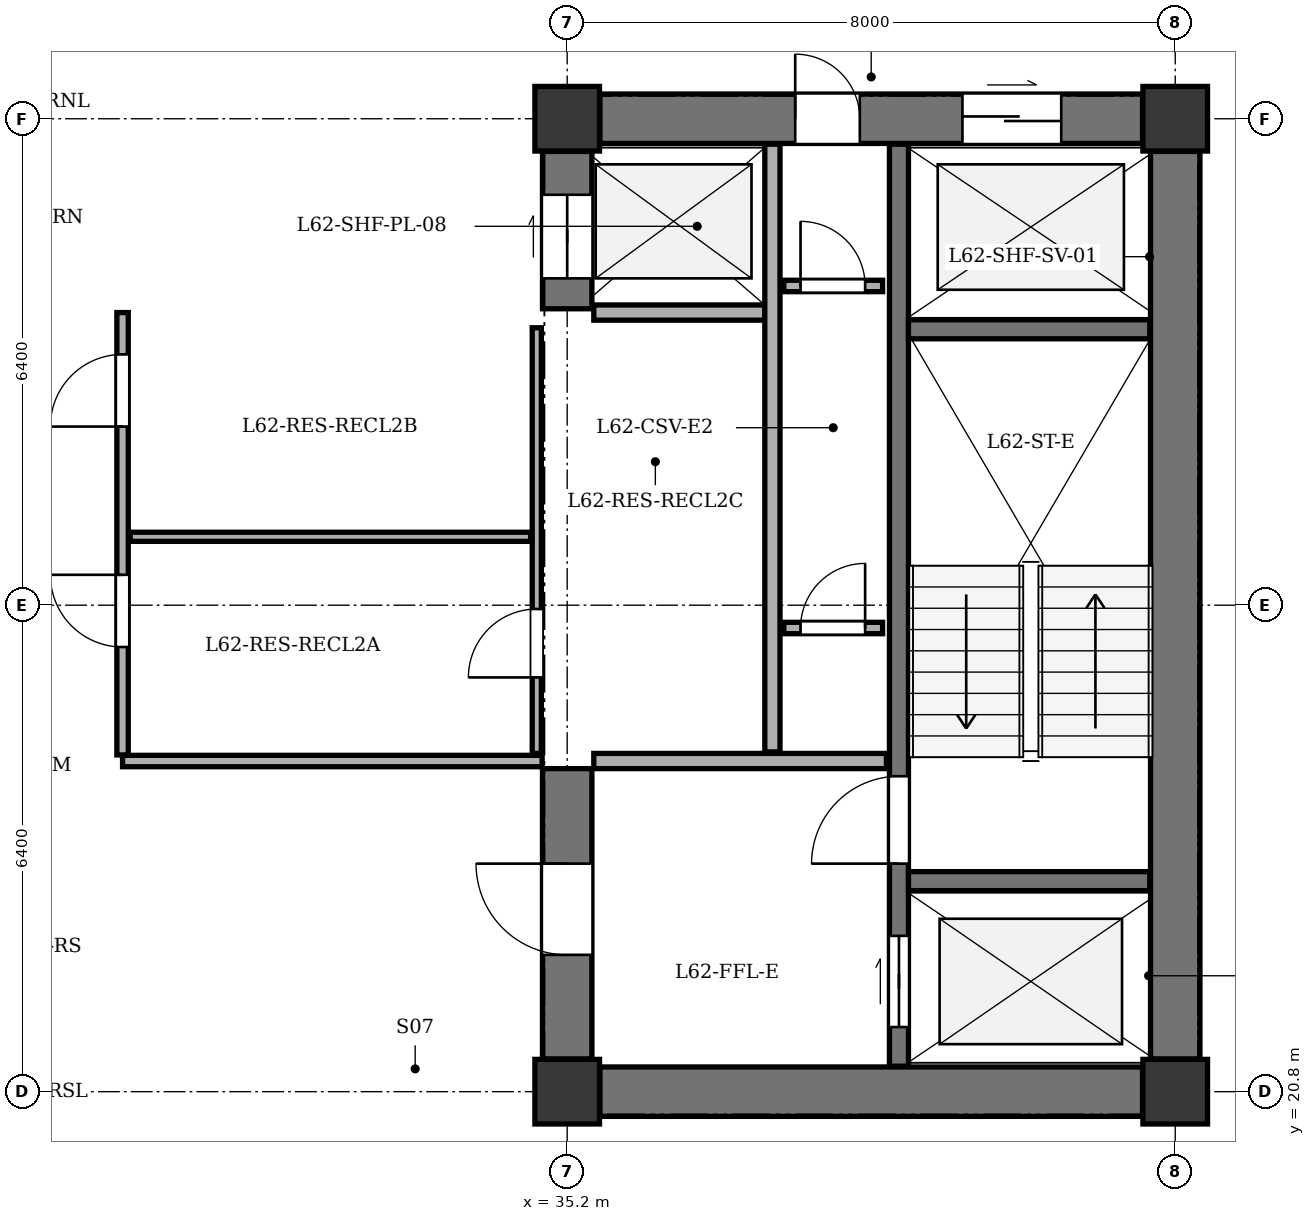
"""IFC4 building model, lengths in metres.
Left out: names, types, materials, properties, quantities, classifications, styles, units other than length and angle.
Written with IfcOpenShell. Run it as: python <this file> out.ifc"""

import sys

from ifc_helpers import new_model, si_unit, direction, frame, frame_2d, origin, origin_2d, place, context, subcontext, project, spatial, rectangle, extrude, element, fill, save


model = new_model("IFC4")
c1 = context("Model", 3, precision=1e-05, world=origin(), true_north=direction((0.0, 1.0)))
c2 = subcontext(c1, "Body", "Model", "MODEL_VIEW")
j1 = project(units=[si_unit("LENGTHUNIT", "METRE"), si_unit("PLANEANGLEUNIT", "RADIAN")], contexts=[c1])
p1 = place(None, origin())
s1 = spatial("IfcSite", under=j1, at=p1, CompositionType="ELEMENT")
p2 = place(p1, origin())
s2 = spatial("IfcBuilding", under=s1, at=p2, CompositionType="ELEMENT")
p3 = place(p2, frame((0.0, 0.0, 238.1)))
s3 = spatial("IfcBuildingStorey", under=s2, at=p3, CompositionType="ELEMENT", Elevation=238.1)
for number, where, z_axis, x_axis in (
    (1, (35.2, 20.8, 0.0), (0.0, 0.0, 1.0), (1.0, 0.0, 0.0)),
    (2, (43.2, 20.8, 0.0), (0.0, 0.0, 1.0), (1.0, 0.0, 0.0)),
    (3, (35.2, 33.6, 0.0), (0.0, 0.0, 1.0), (1.0, 0.0, 0.0)),
    (4, (43.2, 33.6, 0.0), (0.0, 0.0, 1.0), (1.0, 0.0, 0.0)),
):
    element("IfcColumn", number, at=place(p3, frame(where, z_axis=z_axis, x_axis=x_axis)), inside=s3, PredefinedType="COLUMN", context=c2, shape_type="SweptSolid", body=[
        extrude(rectangle(XDim=0.85, YDim=0.85, at=origin_2d()), origin(), (0.0, 0.0, 1.0), 3.4),
    ])
p4 = place(p3, frame((43.2, 21.23, 0.0), z_axis=(0.0, 0.0, 1.0), x_axis=(0.0, 1.0, 0.0)))
e5 = element("IfcWall", 5, at=p4, inside=s3, PredefinedType="SHEAR", context=c2, shape_type="SweptSolid", body=[
    extrude(rectangle(XDim=11.94, YDim=0.65, at=frame_2d((5.97, 0.0))), origin(), (0.0, 0.0, 1.0), 3.1),
])
p5 = place(p3, frame((35.63, 20.8, 0.0), z_axis=(0.0, 0.0, 1.0), x_axis=(1.0, 0.0, 0.0)))
e6 = element("IfcWall", 6, at=p5, inside=s3, PredefinedType="SHEAR", context=c2, shape_type="SweptSolid", body=[
    extrude(rectangle(XDim=7.14, YDim=0.65, at=frame_2d((3.57, 0.0))), origin(), (0.0, 0.0, 1.0), 3.1),
])
p6 = place(p3, frame((35.63, 33.6, 0.0), z_axis=(0.0, 0.0, 1.0), x_axis=(1.0, 0.0, 0.0)))
e7 = element("IfcWall", 7, at=p6, inside=s3, PredefinedType="SHEAR", context=c2, shape_type="SweptSolid", body=[
    extrude(rectangle(XDim=7.14, YDim=0.65, at=frame_2d((3.57, 0.0))), origin(), (0.0, 0.0, 1.0), 3.1),
])
p7 = place(p6, frame((4.77, 0.0, 0.0)))
e8 = element("IfcOpeningElement", 8, at=p7, cuts=e7, PredefinedType="OPENING", context=c2, shape_type="SweptSolid", body=[
    extrude(rectangle(XDim=1.3, YDim=2.15, at=frame_2d((0.65, 1.075))), frame((0.0, 0.335, 0.0), z_axis=(0.0, -1.0, 0.0), x_axis=(1.0, 0.0, 0.0)), (0.0, 0.0, 1.0), 0.67),
])
p8 = place(p6, frame((2.57, 0.0, 0.0)))
e9 = element("IfcOpeningElement", 9, at=p8, cuts=e7, PredefinedType="OPENING", context=c2, shape_type="SweptSolid", body=[
    extrude(rectangle(XDim=0.85, YDim=2.02, at=frame_2d((0.425, 1.01))), frame((0.0, 0.335, 0.0), z_axis=(0.0, -1.0, 0.0), x_axis=(1.0, 0.0, 0.0)), (0.0, 0.0, 1.0), 0.67),
])
p9 = place(p3, frame((35.2, 21.23, 0.0), z_axis=(0.0, 0.0, 1.0), x_axis=(0.0, 1.0, 0.0)))
e10 = element("IfcWall", 10, at=p9, inside=s3, PredefinedType="SHEAR", context=c2, shape_type="SweptSolid", body=[
    extrude(rectangle(XDim=3.82, YDim=0.65, at=frame_2d((1.91, 0.0))), origin(), (0.0, 0.0, 1.0), 3.1),
])
p10 = place(p9, frame((1.37, 0.0, 0.0)))
e11 = element("IfcOpeningElement", 11, at=p10, cuts=e10, PredefinedType="OPENING", context=c2, shape_type="SweptSolid", body=[
    extrude(rectangle(XDim=1.2, YDim=2.15, at=frame_2d((0.6, 1.075))), frame((0.0, 0.335, 0.0), z_axis=(0.0, -1.0, 0.0), x_axis=(1.0, 0.0, 0.0)), (0.0, 0.0, 1.0), 0.67),
])
p11 = place(p3, frame((35.2, 31.1, 0.0), z_axis=(0.0, 0.0, 1.0), x_axis=(0.0, 1.0, 0.0)))
e12 = element("IfcWall", 12, at=p11, inside=s3, PredefinedType="SHEAR", context=c2, shape_type="SweptSolid", body=[
    extrude(rectangle(XDim=2.07, YDim=0.65, at=frame_2d((1.035, 0.0))), origin(), (0.0, 0.0, 1.0), 3.1),
])
p12 = place(p11, frame((0.4, 0.0, 0.0)))
e13 = element("IfcOpeningElement", 13, at=p12, cuts=e12, PredefinedType="OPENING", context=c2, shape_type="SweptSolid", body=[
    extrude(rectangle(XDim=1.1, YDim=2.1, at=frame_2d((0.55, 1.05))), frame((0.0, 0.335, 0.0), z_axis=(0.0, -1.0, 0.0), x_axis=(1.0, 0.0, 0.0)), (0.0, 0.0, 1.0), 0.67),
])
p13 = place(p3, frame((39.565, 21.135, 0.0), z_axis=(0.0, 0.0, 1.0), x_axis=(0.0, 1.0, 0.0)))
e14 = element("IfcWall", 14, at=p13, inside=s3, PredefinedType="SHEAR", context=c2, shape_type="SweptSolid", body=[
    extrude(rectangle(XDim=12.13, YDim=0.25, at=frame_2d((6.065, 0.0))), origin(), (0.0, 0.0, 1.0), 3.1),
])
p14 = place(p13, frame((0.515, 0.0, 0.0)))
e15 = element("IfcOpeningElement", 15, at=p14, cuts=e14, PredefinedType="OPENING", context=c2, shape_type="SweptSolid", body=[
    extrude(rectangle(XDim=1.2, YDim=2.15, at=frame_2d((0.6, 1.075))), frame((0.0, 0.135, 0.0), z_axis=(0.0, -1.0, 0.0), x_axis=(1.0, 0.0, 0.0)), (0.0, 0.0, 1.0), 0.27),
])
p15 = place(p13, frame((2.665, 0.0, 0.0)))
e16 = element("IfcOpeningElement", 16, at=p15, cuts=e14, PredefinedType="OPENING", context=c2, shape_type="SweptSolid", body=[
    extrude(rectangle(XDim=1.15, YDim=2.15, at=frame_2d((0.575, 1.075))), frame((0.0, 0.135, 0.0), z_axis=(0.0, -1.0, 0.0), x_axis=(1.0, 0.0, 0.0)), (0.0, 0.0, 1.0), 0.27),
])
for number, where, z_axis, x_axis in (
    (17, (39.69, 23.57, 0.0), (0.0, 0.0, 1.0), (1.0, 0.0, 0.0)),
    (18, (39.69, 30.83, 0.0), (0.0, 0.0, 1.0), (1.0, 0.0, 0.0)),
):
    element("IfcWall", number, at=place(p3, frame(where, z_axis=z_axis, x_axis=x_axis)), inside=s3, PredefinedType="SHEAR", context=c2, shape_type="SweptSolid", body=[
        extrude(rectangle(XDim=3.175, YDim=0.25, at=frame_2d((1.587, 0.0))), origin(), (0.0, 0.0, 1.0), 3.1),
    ])
p16 = place(p3, frame((35.55, 25.15, 0.0), z_axis=(0.0, 0.0, 1.0), x_axis=(1.0, 0.0, 0.0)))
e19 = element("IfcWall", 19, at=p16, inside=s3, PredefinedType="SOLIDWALL", context=c2, shape_type="SweptSolid", body=[
    extrude(rectangle(XDim=3.85, YDim=0.2, at=frame_2d((1.925, 0.0))), origin(), (0.0, 0.0, 1.0), 3.1),
])
p17 = place(p3, frame((35.55, 31.05, 0.0), z_axis=(0.0, 0.0, 1.0), x_axis=(1.0, 0.0, 0.0)))
e20 = element("IfcWall", 20, at=p17, inside=s3, PredefinedType="SOLIDWALL", context=c2, shape_type="SweptSolid", body=[
    extrude(rectangle(XDim=2.25, YDim=0.2, at=frame_2d((1.125, 0.0))), origin(), (0.0, 0.0, 1.0), 3.1),
])
p18 = place(p3, frame((37.9, 25.27, 0.0), z_axis=(0.0, 0.0, 1.0), x_axis=(0.0, 1.0, 0.0)))
e21 = element("IfcWall", 21, at=p18, inside=s3, PredefinedType="SOLIDWALL", context=c2, shape_type="SweptSolid", body=[
    extrude(rectangle(XDim=7.995, YDim=0.2, at=frame_2d((3.998, 0.0))), origin(), (0.0, 0.0, 1.0), 3.1),
])
p19 = place(p3, frame((38.05, 26.9, 0.0), z_axis=(0.0, 0.0, 1.0), x_axis=(1.0, 0.0, 0.0)))
e22 = element("IfcWall", 22, at=p19, inside=s3, PredefinedType="PARTITIONING", context=c2, shape_type="SweptSolid", body=[
    extrude(rectangle(XDim=1.3, YDim=0.15, at=frame_2d((0.65, 0.0))), origin(), (0.0, 0.0, 1.0), 3.1),
])
p20 = place(p19, frame((0.22, 0.0, 0.0)))
e23 = element("IfcOpeningElement", 23, at=p20, cuts=e22, PredefinedType="OPENING", context=c2, shape_type="SweptSolid", body=[
    extrude(rectangle(XDim=0.85, YDim=2.02, at=frame_2d((0.425, 1.01))), frame((0.0, 0.085, 0.0), z_axis=(0.0, -1.0, 0.0), x_axis=(1.0, 0.0, 0.0)), (0.0, 0.0, 1.0), 0.17),
])
p21 = place(p3, frame((38.05, 31.4, 0.0), z_axis=(0.0, 0.0, 1.0), x_axis=(1.0, 0.0, 0.0)))
e24 = element("IfcWall", 24, at=p21, inside=s3, PredefinedType="PARTITIONING", context=c2, shape_type="SweptSolid", body=[
    extrude(rectangle(XDim=1.3, YDim=0.15, at=frame_2d((0.65, 0.0))), origin(), (0.0, 0.0, 1.0), 3.1),
])
p22 = place(p21, frame((0.22, 0.0, 0.0)))
e25 = element("IfcOpeningElement", 25, at=p22, cuts=e24, PredefinedType="OPENING", context=c2, shape_type="SweptSolid", body=[
    extrude(rectangle(XDim=0.85, YDim=2.02, at=frame_2d((0.425, 1.01))), frame((0.0, 0.085, 0.0), z_axis=(0.0, -1.0, 0.0), x_axis=(1.0, 0.0, 0.0)), (0.0, 0.0, 1.0), 0.17),
])
p23 = place(p3, frame((29.35, 25.15, 0.0), z_axis=(0.0, 0.0, 1.0), x_axis=(1.0, 0.0, 0.0)))
e26 = element("IfcWall", 26, at=p23, inside=s3, PredefinedType="PARTITIONING", context=c2, shape_type="SweptSolid", body=[
    extrude(rectangle(XDim=5.52, YDim=0.15, at=frame_2d((2.76, 0.0))), origin(), (0.0, 0.0, 1.0), 3.1),
])
p24 = place(p3, frame((29.35, 25.23, 0.0), z_axis=(0.0, 0.0, 1.0), x_axis=(0.0, 1.0, 0.0)))
e27 = element("IfcWall", 27, at=p24, inside=s3, PredefinedType="PARTITIONING", context=c2, shape_type="SweptSolid", body=[
    extrude(rectangle(XDim=5.82, YDim=0.15, at=frame_2d((2.91, 0.0))), origin(), (0.0, 0.0, 1.0), 3.1),
])
p25 = place(p24, frame((1.42, 0.0, 0.0)))
e28 = element("IfcOpeningElement", 28, at=p25, cuts=e27, PredefinedType="OPENING", context=c2, shape_type="SweptSolid", body=[
    extrude(rectangle(XDim=0.95, YDim=2.1, at=frame_2d((0.475, 1.05))), frame((0.0, 0.085, 0.0), z_axis=(0.0, -1.0, 0.0), x_axis=(1.0, 0.0, 0.0)), (0.0, 0.0, 1.0), 0.17),
])
p26 = place(p24, frame((4.32, 0.0, 0.0)))
e29 = element("IfcOpeningElement", 29, at=p26, cuts=e27, PredefinedType="OPENING", context=c2, shape_type="SweptSolid", body=[
    extrude(rectangle(XDim=0.95, YDim=2.1, at=frame_2d((0.475, 1.05))), frame((0.0, 0.085, 0.0), z_axis=(0.0, -1.0, 0.0), x_axis=(1.0, 0.0, 0.0)), (0.0, 0.0, 1.0), 0.17),
])
p27 = place(p3, frame((34.8, 25.25, 0.0), z_axis=(0.0, 0.0, 1.0), x_axis=(0.0, 1.0, 0.0)))
e30 = element("IfcWall", 30, at=p27, inside=s3, PredefinedType="PARTITIONING", context=c2, shape_type="SweptSolid", body=[
    extrude(rectangle(XDim=5.6, YDim=0.12, at=frame_2d((2.8, 0.0))), origin(), (0.0, 0.0, 1.0), 3.1),
])
p28 = place(p27, frame((1.0, 0.0, 0.0)))
e31 = element("IfcOpeningElement", 31, at=p28, cuts=e30, PredefinedType="OPENING", context=c2, shape_type="SweptSolid", body=[
    extrude(rectangle(XDim=0.9, YDim=2.05, at=frame_2d((0.45, 1.025))), frame((0.0, 0.07, 0.0), z_axis=(0.0, -1.0, 0.0), x_axis=(1.0, 0.0, 0.0)), (0.0, 0.0, 1.0), 0.14),
])
p29 = place(p3, frame((29.45, 28.1, 0.0), z_axis=(0.0, 0.0, 1.0), x_axis=(1.0, 0.0, 0.0)))
e32 = element("IfcWall", 32, at=p29, inside=s3, PredefinedType="PARTITIONING", context=c2, shape_type="SweptSolid", body=[
    extrude(rectangle(XDim=5.27, YDim=0.12, at=frame_2d((2.635, 0.0))), origin(), (0.0, 0.0, 1.0), 3.1),
])
p30 = place(p7, origin())
e33 = element("IfcDoor", 33, at=p30, inside=s3, OperationType="DOUBLE_DOOR_SLIDING", PredefinedType="DOOR", context=c2, shape_type="SweptSolid", body=[
    extrude(rectangle(XDim=1.3, YDim=2.15, at=frame_2d((0.65, 1.075))), frame((0.0, 0.025, 0.0), z_axis=(0.0, -1.0, 0.0), x_axis=(1.0, 0.0, 0.0)), (0.0, 0.0, 1.0), 0.05),
])
fill(e8, e33)
p31 = place(p8, origin())
e34 = element("IfcDoor", 34, at=p31, inside=s3, OperationType="SINGLE_SWING_LEFT", PredefinedType="DOOR", context=c2, shape_type="SweptSolid", body=[
    extrude(rectangle(XDim=0.85, YDim=2.02, at=frame_2d((0.425, 1.01))), frame((0.0, 0.025, 0.0), z_axis=(0.0, -1.0, 0.0), x_axis=(1.0, 0.0, 0.0)), (0.0, 0.0, 1.0), 0.05),
])
fill(e9, e34)
p32 = place(p10, origin())
e35 = element("IfcDoor", 35, at=p32, inside=s3, OperationType="SINGLE_SWING_RIGHT", PredefinedType="DOOR", context=c2, shape_type="SweptSolid", body=[
    extrude(rectangle(XDim=1.2, YDim=2.15, at=frame_2d((0.6, 1.075))), frame((0.0, 0.025, 0.0), z_axis=(0.0, -1.0, 0.0), x_axis=(1.0, 0.0, 0.0)), (0.0, 0.0, 1.0), 0.05),
])
fill(e11, e35)
p33 = place(p12, origin())
e36 = element("IfcDoor", 36, at=p33, inside=s3, OperationType="DOUBLE_DOOR_SLIDING", PredefinedType="DOOR", context=c2, shape_type="SweptSolid", body=[
    extrude(rectangle(XDim=1.1, YDim=2.1, at=frame_2d((0.55, 1.05))), frame((0.0, 0.025, 0.0), z_axis=(0.0, -1.0, 0.0), x_axis=(1.0, 0.0, 0.0)), (0.0, 0.0, 1.0), 0.05),
])
fill(e13, e36)
p34 = place(p14, origin())
e37 = element("IfcDoor", 37, at=p34, inside=s3, OperationType="DOUBLE_DOOR_SLIDING", PredefinedType="DOOR", context=c2, shape_type="SweptSolid", body=[
    extrude(rectangle(XDim=1.2, YDim=2.15, at=frame_2d((0.6, 1.075))), frame((0.0, 0.025, 0.0), z_axis=(0.0, -1.0, 0.0), x_axis=(1.0, 0.0, 0.0)), (0.0, 0.0, 1.0), 0.05),
])
fill(e15, e37)
p35 = place(p15, origin())
e38 = element("IfcDoor", 38, at=p35, inside=s3, OperationType="SINGLE_SWING_LEFT", PredefinedType="DOOR", context=c2, shape_type="SweptSolid", body=[
    extrude(rectangle(XDim=1.15, YDim=2.15, at=frame_2d((0.575, 1.075))), frame((0.0, 0.025, 0.0), z_axis=(0.0, -1.0, 0.0), x_axis=(1.0, 0.0, 0.0)), (0.0, 0.0, 1.0), 0.05),
])
fill(e16, e38)
p36 = place(p20, origin())
e39 = element("IfcDoor", 39, at=p36, inside=s3, OperationType="SINGLE_SWING_RIGHT", PredefinedType="DOOR", context=c2, shape_type="SweptSolid", body=[
    extrude(rectangle(XDim=0.85, YDim=2.02, at=frame_2d((0.425, 1.01))), frame((0.0, 0.025, 0.0), z_axis=(0.0, -1.0, 0.0), x_axis=(1.0, 0.0, 0.0)), (0.0, 0.0, 1.0), 0.05),
])
fill(e23, e39)
p37 = place(p22, origin())
e40 = element("IfcDoor", 40, at=p37, inside=s3, OperationType="SINGLE_SWING_LEFT", PredefinedType="DOOR", context=c2, shape_type="SweptSolid", body=[
    extrude(rectangle(XDim=0.85, YDim=2.02, at=frame_2d((0.425, 1.01))), frame((0.0, 0.025, 0.0), z_axis=(0.0, -1.0, 0.0), x_axis=(1.0, 0.0, 0.0)), (0.0, 0.0, 1.0), 0.05),
])
fill(e25, e40)
p38 = place(p28, origin())
e41 = element("IfcDoor", 41, at=p38, inside=s3, OperationType="SINGLE_SWING_LEFT", PredefinedType="DOOR", context=c2, shape_type="SweptSolid", body=[
    extrude(rectangle(XDim=0.9, YDim=2.05, at=frame_2d((0.45, 1.025))), frame((0.0, 0.025, 0.0), z_axis=(0.0, -1.0, 0.0), x_axis=(1.0, 0.0, 0.0)), (0.0, 0.0, 1.0), 0.05),
])
fill(e31, e41)
p39 = place(p25, origin())
e42 = element("IfcDoor", 42, at=p39, inside=s3, OperationType="SINGLE_SWING_RIGHT", PredefinedType="DOOR", context=c2, shape_type="SweptSolid", body=[
    extrude(rectangle(XDim=0.95, YDim=2.1, at=frame_2d((0.475, 1.05))), frame((0.0, 0.025, 0.0), z_axis=(0.0, -1.0, 0.0), x_axis=(1.0, 0.0, 0.0)), (0.0, 0.0, 1.0), 0.05),
])
fill(e28, e42)
p40 = place(p26, origin())
e43 = element("IfcDoor", 43, at=p40, inside=s3, OperationType="SINGLE_SWING_LEFT", PredefinedType="DOOR", context=c2, shape_type="SweptSolid", body=[
    extrude(rectangle(XDim=0.95, YDim=2.1, at=frame_2d((0.475, 1.05))), frame((0.0, 0.025, 0.0), z_axis=(0.0, -1.0, 0.0), x_axis=(1.0, 0.0, 0.0)), (0.0, 0.0, 1.0), 0.05),
])
fill(e29, e43)
save(model, sys.argv[1])
